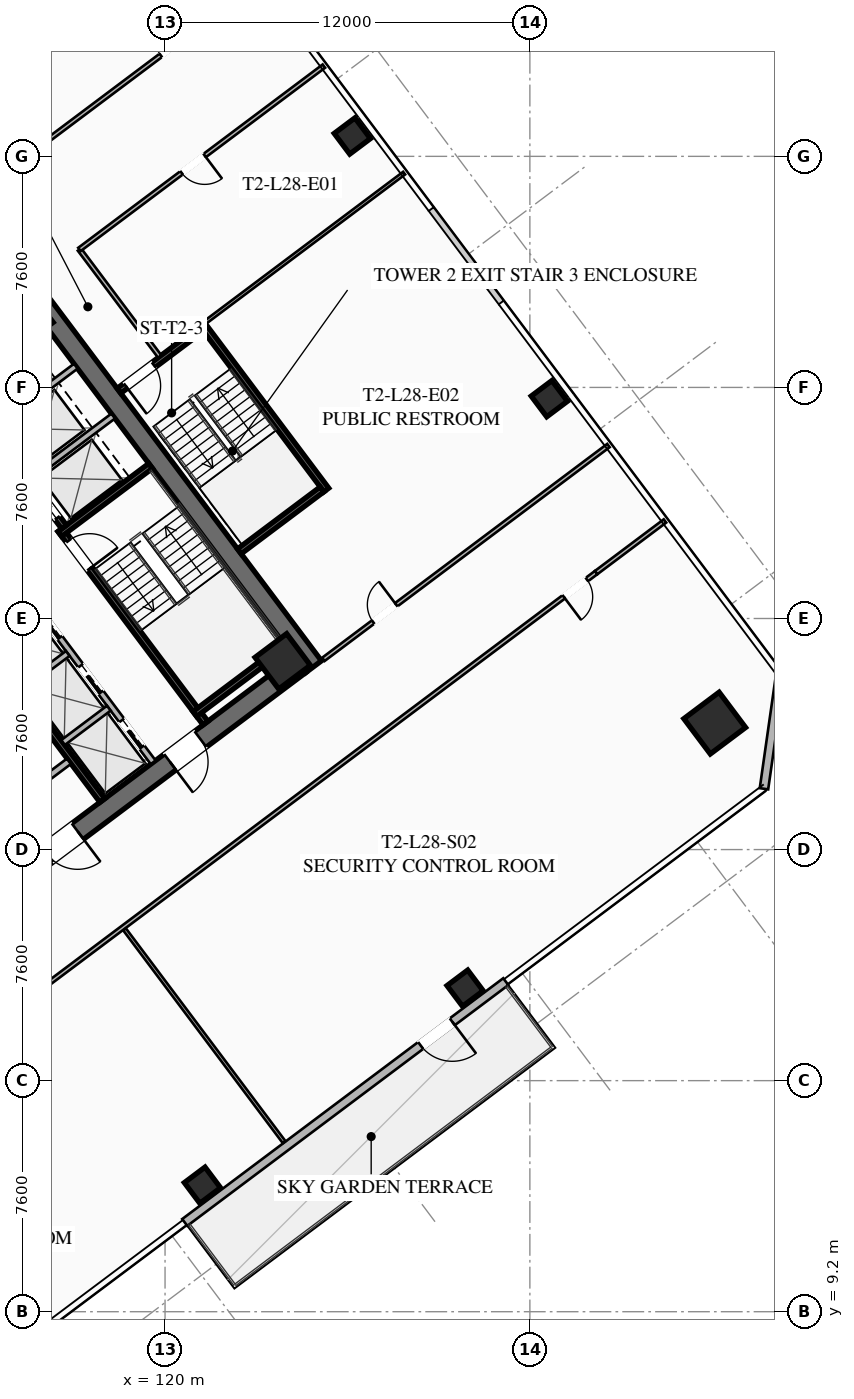
"""IFC4 building model, lengths in metres.
Left out: names, types, materials, properties, quantities, classifications, styles, units other than length and angle.
Written with IfcOpenShell. Run it as: python <this file> out.ifc"""

import sys

from ifc_helpers import new_model, si_unit, direction, frame, frame_2d, origin, origin_2d, place, context, subcontext, project, spatial, rectangle, hollow_rectangle, extrude, element, fill, save


model = new_model("IFC4")
c1 = context("Model", 3, precision=1e-05, world=origin(), true_north=direction((0.0, 1.0)))
c2 = subcontext(c1, "Body", "Model", "MODEL_VIEW")
j1 = project(units=[si_unit("LENGTHUNIT", "METRE"), si_unit("PLANEANGLEUNIT", "RADIAN")], contexts=[c1])
p1 = place(None, origin())
s1 = spatial("IfcSite", under=j1, at=p1, CompositionType="ELEMENT")
p2 = place(p1, origin())
s2 = spatial("IfcBuilding", under=s1, at=p2, CompositionType="ELEMENT")
p3 = place(p2, frame((0.0, 0.0, 106.25)))
s3 = spatial("IfcBuildingStorey", under=s2, at=p3, CompositionType="ELEMENT", Elevation=106.25)
p4 = place(p3, frame((115.524, 42.893, 0.0), z_axis=(0.0, 0.0, 1.0), x_axis=(0.600005007985, -0.799996243986, 0.0)))
e1 = element("IfcWall", 1, at=p4, inside=s3, PredefinedType="SHEAR", context=c2, shape_type="SweptSolid", body=[
    extrude(rectangle(XDim=15.6, YDim=0.65, at=frame_2d((7.8, 0.0))), origin(), (0.0, 0.0, 1.0), 3.55),
])
p5 = place(p3, frame((124.429, 30.478, 0.0), z_axis=(0.0, 0.0, 1.0), x_axis=(-0.799998028465, -0.600002628705, 0.0)))
e2 = element("IfcWall", 2, at=p5, inside=s3, PredefinedType="SHEAR", context=c2, shape_type="SweptSolid", body=[
    extrude(rectangle(XDim=14.86, YDim=0.65, at=frame_2d((7.43, 0.0))), origin(), (0.0, 0.0, 1.0), 3.55),
])
p6 = place(p5, frame((9.13, 0.0, 0.0)))
e3 = element("IfcOpeningElement", 3, at=p6, cuts=e2, PredefinedType="OPENING", context=c2, shape_type="SweptSolid", body=[
    extrude(rectangle(XDim=1.25, YDim=2.25, at=frame_2d((0.625, 1.125))), frame((0.0, 0.335, 0.0), z_axis=(0.0, -1.0, 0.0), x_axis=(1.0, 0.0, 0.0)), (0.0, 0.0, 1.0), 0.67),
])
p7 = place(p5, frame((4.08, 0.0, 0.0)))
e4 = element("IfcOpeningElement", 4, at=p7, cuts=e2, PredefinedType="OPENING", context=c2, shape_type="SweptSolid", body=[
    extrude(rectangle(XDim=1.25, YDim=2.25, at=frame_2d((0.625, 1.125))), frame((0.0, 0.335, 0.0), z_axis=(0.0, -1.0, 0.0), x_axis=(1.0, 0.0, 0.0)), (0.0, 0.0, 1.0), 0.67),
])
for number, where, z_axis, x_axis in (
    (5, (123.87, 30.59, 0.0), (0.0, 0.0, 1.0), (0.8, 0.6, 0.0)),
    (6, (115.41, 41.87, 0.0), (0.0, 0.0, 1.0), (0.8, 0.6, 0.0)),
):
    element("IfcColumn", number, at=place(p3, frame(where, z_axis=z_axis, x_axis=x_axis)), inside=s3, PredefinedType="COLUMN", context=c2, shape_type="SweptSolid", body=[
        extrude(hollow_rectangle(XDim=1.3, YDim=1.3, WallThickness=0.05, at=origin_2d()), origin(), (0.0, 0.0, 1.0), 3.25),
    ])
p8 = place(p3, frame((138.08, 28.56, 0.0), z_axis=(0.0, 0.0, 1.0), x_axis=(0.799999996291, 0.600000004945, 0.0)))
e7 = element("IfcColumn", 7, at=p8, inside=s3, PredefinedType="COLUMN", context=c2, shape_type="SweptSolid", body=[
    extrude(hollow_rectangle(XDim=1.45, YDim=1.45, WallThickness=0.055, at=origin_2d()), origin(), (0.0, 0.0, 1.0), 3.25),
])
for number, where, z_axis, x_axis in (
    (8, (121.23, 13.36, 0.0), (0.0, 0.0, 1.0), (0.8, 0.6, 0.0)),
    (9, (129.87, 19.84, 0.0), (0.0, 0.0, 1.0), (0.8, 0.6, 0.0)),
    (10, (132.64, 39.23, 0.0), (0.0, 0.0, 1.0), (0.8, 0.6, 0.0)),
    (11, (126.16, 47.87, 0.0), (0.0, 0.0, 1.0), (0.8, 0.6, 0.0)),
):
    element("IfcColumn", number, at=place(p3, frame(where, z_axis=z_axis, x_axis=x_axis)), inside=s3, PredefinedType="COLUMN", context=c2, shape_type="SweptSolid", body=[
        extrude(hollow_rectangle(XDim=0.85, YDim=0.85, WallThickness=0.035, at=origin_2d()), origin(), (0.0, 0.0, 1.0), 3.25),
    ])
p9 = place(p3, frame((131.208, 20.056, 0.0), z_axis=(0.0, 0.0, 1.0), x_axis=(-0.800004438899, -0.599994081423, 0.0)))
e12 = element("IfcWall", 12, at=p9, inside=s3, PredefinedType="SOLIDWALL", context=c2, shape_type="SweptSolid", body=[
    extrude(rectangle(XDim=13.2, YDim=0.28, at=frame_2d((6.6, 0.0))), origin(), (0.0, 0.0, 1.0), 3.25),
])
p10 = place(p9, frame((2.2, 0.0, 0.0)))
e13 = element("IfcOpeningElement", 13, at=p10, cuts=e12, PredefinedType="OPENING", context=c2, shape_type="SweptSolid", body=[
    extrude(rectangle(XDim=1.3, YDim=2.15, at=frame_2d((0.65, 1.075))), frame((0.0, 0.15, 0.0), z_axis=(0.0, -1.0, 0.0), x_axis=(1.0, 0.0, 0.0)), (0.0, 0.0, 1.0), 0.3),
])
p11 = place(p3, frame((140.24, 30.18, 0.0), z_axis=(0.0, 0.0, 1.0), x_axis=(-0.141430307517, -0.989948214866, 0.0)))
e14 = element("IfcWall", 14, at=p11, inside=s3, PredefinedType="SOLIDWALL", context=c2, shape_type="SweptSolid", body=[
    extrude(rectangle(XDim=3.818, YDim=0.28, at=frame_2d((1.909, 0.0))), origin(), (0.0, 0.0, 1.0), 3.25),
])
p12 = place(p3, frame((116.56, 34.92, 0.0), z_axis=(0.0, 0.0, 1.0), x_axis=(0.600009827119, -0.799992629566, 0.0)))
e15 = element("IfcWall", 15, at=p12, inside=s3, PredefinedType="SHEAR", context=c2, shape_type="SweptSolid", body=[
    extrude(rectangle(XDim=7.95, YDim=0.2, at=frame_2d((3.975, 0.0))), origin(), (0.0, 0.0, 1.0), 3.25),
])
p13 = place(p12, frame((0.45, 0.0, 0.0)))
e16 = element("IfcOpeningElement", 16, at=p13, cuts=e15, PredefinedType="OPENING", context=c2, shape_type="SweptSolid", body=[
    extrude(rectangle(XDim=1.15, YDim=2.2, at=frame_2d((0.575, 1.1))), frame((0.0, 0.11, 0.0), z_axis=(0.0, -1.0, 0.0), x_axis=(1.0, 0.0, 0.0)), (0.0, 0.0, 1.0), 0.22),
])
for number, where, z_axis, x_axis in (
    (17, (116.54, 34.78, 0.0), (0.0, 0.0, 1.0), (0.8, 0.6, 0.0)),
    (18, (120.98, 28.86, 0.0), (0.0, 0.0, 1.0), (0.8, 0.6, 0.0)),
):
    element("IfcWall", number, at=place(p3, frame(where, z_axis=z_axis, x_axis=x_axis)), inside=s3, PredefinedType="SHEAR", context=c2, shape_type="SweptSolid", body=[
        extrude(rectangle(XDim=3.73, YDim=0.2, at=frame_2d((1.865, 0.0))), origin(), (0.0, 0.0, 1.0), 3.25),
    ])
p14 = place(p3, frame((117.938, 26.016, 0.0), z_axis=(0.0, 0.0, 1.0), x_axis=(-0.600005463273, 0.799995902516, 0.0)))
e19 = element("IfcWall", 19, at=p14, inside=s3, PredefinedType="SHEAR", context=c2, shape_type="SweptSolid", body=[
    extrude(rectangle(XDim=14.3, YDim=0.2, at=frame_2d((7.15, 0.0))), origin(), (0.0, 0.0, 1.0), 3.25),
])
p15 = place(p3, frame((114.316, 25.412, 0.0), z_axis=(0.0, 0.0, 1.0), x_axis=(0.800018601094, 0.59997519774, 0.0)))
e20 = element("IfcWall", 20, at=p15, inside=s3, PredefinedType="SOLIDWALL", context=c2, shape_type="SweptSolid", body=[
    extrude(rectangle(XDim=3.15, YDim=0.22, at=frame_2d((1.575, 0.0))), origin(), (0.0, 0.0, 1.0), 2.393),
])
p16 = place(p15, frame((0.95, 0.0, 0.0)))
e21 = element("IfcOpeningElement", 21, at=p16, cuts=e20, PredefinedType="OPENING", context=c2, shape_type="SweptSolid", body=[
    extrude(rectangle(XDim=1.25, YDim=2.25, at=frame_2d((0.625, 1.125))), frame((0.0, 0.12, 0.0), z_axis=(0.0, -1.0, 0.0), x_axis=(1.0, 0.0, 0.0)), (0.0, 0.0, 1.0), 0.24),
])
p17 = place(p3, frame((112.87, 40.09, 0.0), z_axis=(0.0, 0.0, 1.0), x_axis=(0.599975393228, -0.800018454488, 0.0)))
e22 = element("IfcWall", 22, at=p17, inside=s3, PredefinedType="SHEAR", context=c2, shape_type="SweptSolid", body=[
    extrude(rectangle(XDim=6.35, YDim=0.2, at=frame_2d((3.175, 0.0))), origin(), (0.0, 0.0, 1.0), 3.25),
])
p18 = place(p17, frame((4.875, 0.0, 0.0)))
e23 = element("IfcOpeningElement", 23, at=p18, cuts=e22, PredefinedType="OPENING", context=c2, shape_type="SweptSolid", body=[
    extrude(rectangle(XDim=1.1, YDim=2.2, at=frame_2d((0.55, 1.1))), frame((0.0, 0.11, 0.0), z_axis=(0.0, -1.0, 0.0), x_axis=(1.0, 0.0, 0.0)), (0.0, 0.0, 1.0), 0.22),
])
p19 = place(p17, frame((2.825, 0.0, 0.0)))
e24 = element("IfcOpeningElement", 24, at=p19, cuts=e22, PredefinedType="OPENING", context=c2, shape_type="SweptSolid", body=[
    extrude(rectangle(XDim=1.1, YDim=2.2, at=frame_2d((0.55, 1.1))), frame((0.0, 0.11, 0.0), z_axis=(0.0, -1.0, 0.0), x_axis=(1.0, 0.0, 0.0)), (0.0, 0.0, 1.0), 0.22),
])
p20 = place(p17, frame((0.825, 0.0, 0.0)))
e25 = element("IfcOpeningElement", 25, at=p20, cuts=e22, PredefinedType="OPENING", context=c2, shape_type="SweptSolid", body=[
    extrude(rectangle(XDim=1.1, YDim=2.2, at=frame_2d((0.55, 1.1))), frame((0.0, 0.11, 0.0), z_axis=(0.0, -1.0, 0.0), x_axis=(1.0, 0.0, 0.0)), (0.0, 0.0, 1.0), 0.22),
])
for number, where, z_axis, x_axis in (
    (26, (115.59, 36.63, 0.0), (0.0, 0.0, 1.0), (0.8, 0.6, 0.0)),
    (27, (114.36, 38.27, 0.0), (0.0, 0.0, 1.0), (0.8, 0.6, 0.0)),
):
    element("IfcWall", number, at=place(p3, frame(where, z_axis=z_axis, x_axis=x_axis)), inside=s3, PredefinedType="SOLIDWALL", context=c2, shape_type="SweptSolid", body=[
        extrude(rectangle(XDim=3.38, YDim=0.2, at=frame_2d((1.69, 0.0))), origin(), (0.0, 0.0, 1.0), 3.25),
    ])
p21 = place(p3, frame((119.61, 27.27, 0.0), z_axis=(0.0, 0.0, 1.0), x_axis=(-0.600011488909, 0.79999138319, 0.0)))
e28 = element("IfcWall", 28, at=p21, inside=s3, PredefinedType="SOLIDWALL", context=c2, shape_type="SweptSolid", body=[
    extrude(rectangle(XDim=6.8, YDim=0.2, at=frame_2d((3.4, 0.0))), origin(), (0.0, 0.0, 1.0), 3.25),
])
p22 = place(p21, frame((0.625, 0.0, 0.0)))
e29 = element("IfcOpeningElement", 29, at=p22, cuts=e28, PredefinedType="OPENING", context=c2, shape_type="SweptSolid", body=[
    extrude(rectangle(XDim=1.1, YDim=2.2, at=frame_2d((0.55, 1.1))), frame((0.0, 0.11, 0.0), z_axis=(0.0, -1.0, 0.0), x_axis=(1.0, 0.0, 0.0)), (0.0, 0.0, 1.0), 0.22),
])
p23 = place(p21, frame((2.875, 0.0, 0.0)))
e30 = element("IfcOpeningElement", 30, at=p23, cuts=e28, PredefinedType="OPENING", context=c2, shape_type="SweptSolid", body=[
    extrude(rectangle(XDim=1.1, YDim=2.2, at=frame_2d((0.55, 1.1))), frame((0.0, 0.11, 0.0), z_axis=(0.0, -1.0, 0.0), x_axis=(1.0, 0.0, 0.0)), (0.0, 0.0, 1.0), 0.22),
])
p24 = place(p21, frame((5.125, 0.0, 0.0)))
e31 = element("IfcOpeningElement", 31, at=p24, cuts=e28, PredefinedType="OPENING", context=c2, shape_type="SweptSolid", body=[
    extrude(rectangle(XDim=1.1, YDim=2.2, at=frame_2d((0.55, 1.1))), frame((0.0, 0.11, 0.0), z_axis=(0.0, -1.0, 0.0), x_axis=(1.0, 0.0, 0.0)), (0.0, 0.0, 1.0), 0.22),
])
p25 = place(p3, frame((116.646, 27.922, 0.0), z_axis=(0.0, 0.0, 1.0), x_axis=(0.8, 0.6, 0.0)))
e32 = element("IfcWall", 32, at=p25, inside=s3, PredefinedType="SOLIDWALL", context=c2, shape_type="SweptSolid", body=[
    extrude(rectangle(XDim=1.88, YDim=0.2, at=frame_2d((0.94, 0.0))), origin(), (0.0, 0.0, 1.0), 3.25),
])
p26 = place(p3, frame((115.296, 29.722, 0.0), z_axis=(0.0, 0.0, 1.0), x_axis=(0.799984418148, 0.600020775241, 0.0)))
e33 = element("IfcWall", 33, at=p26, inside=s3, PredefinedType="SOLIDWALL", context=c2, shape_type="SweptSolid", body=[
    extrude(rectangle(XDim=1.88, YDim=0.2, at=frame_2d((0.94, 0.0))), origin(), (0.0, 0.0, 1.0), 3.25),
])
p27 = place(p3, frame((125.304, 36.228, 0.0), z_axis=(0.0, 0.0, 1.0), x_axis=(-0.59998851072, 0.800008616831, 0.0)))
e34 = element("IfcWall", 34, at=p27, inside=s3, PredefinedType="SHEAR", context=c2, shape_type="SweptSolid", body=[
    extrude(rectangle(XDim=6.8, YDim=0.2, at=frame_2d((3.4, 0.0))), origin(), (0.0, 0.0, 1.0), 3.25),
])
p28 = place(p3, frame((121.204, 41.528, 0.0), z_axis=(0.0, 0.0, 1.0), x_axis=(-0.800017232136, -0.599977023131, 0.0)))
e35 = element("IfcWall", 35, at=p28, inside=s3, PredefinedType="SHEAR", context=c2, shape_type="SweptSolid", body=[
    extrude(rectangle(XDim=3.4, YDim=0.2, at=frame_2d((1.7, 0.0))), origin(), (0.0, 0.0, 1.0), 3.25),
])
p29 = place(p28, frame((1.975, 0.0, 0.0)))
e36 = element("IfcOpeningElement", 36, at=p29, cuts=e35, PredefinedType="OPENING", context=c2, shape_type="SweptSolid", body=[
    extrude(rectangle(XDim=1.15, YDim=2.2, at=frame_2d((0.575, 1.1))), frame((0.0, 0.11, 0.0), z_axis=(0.0, -1.0, 0.0), x_axis=(1.0, 0.0, 0.0)), (0.0, 0.0, 1.0), 0.22),
])
p30 = place(p3, frame((122.444, 34.208, 0.0), z_axis=(0.0, 0.0, 1.0), x_axis=(0.79999138319, 0.600011488909, 0.0)))
e37 = element("IfcWall", 37, at=p30, inside=s3, PredefinedType="SHEAR", context=c2, shape_type="SweptSolid", body=[
    extrude(rectangle(XDim=3.4, YDim=0.2, at=frame_2d((1.7, 0.0))), origin(), (0.0, 0.0, 1.0), 3.25),
])
p31 = place(p3, frame((119.824, 40.618, 0.0), z_axis=(0.0, 0.0, 1.0), x_axis=(-0.599982243973, 0.800013316712, 0.0)))
e38 = element("IfcWall", 38, at=p31, inside=s3, PredefinedType="PARTITIONING", context=c2, shape_type="SweptSolid", body=[
    extrude(rectangle(XDim=4.4, YDim=0.135, at=frame_2d((2.2, 0.0))), origin(), (0.0, 0.0, 1.0), 2.393),
])
p32 = place(p3, frame((98.276, 34.332, 0.0), z_axis=(0.0, 0.0, 1.0), x_axis=(0.800003113347, 0.599995848849, 0.0)))
e39 = element("IfcWall", 39, at=p32, inside=s3, PredefinedType="PARTITIONING", context=c2, shape_type="SweptSolid", body=[
    extrude(rectangle(XDim=28.23, YDim=0.135, at=frame_2d((14.115, 0.0))), origin(), (0.0, 0.0, 1.0), 2.393),
])
p33 = place(p32, frame((26.98, 0.0, 0.0)))
e40 = element("IfcOpeningElement", 40, at=p33, cuts=e39, PredefinedType="OPENING", context=c2, shape_type="SweptSolid", body=[
    extrude(rectangle(XDim=0.95, YDim=2.05, at=frame_2d((0.475, 1.025))), frame((0.0, 0.077, 0.0), z_axis=(0.0, -1.0, 0.0), x_axis=(1.0, 0.0, 0.0)), (0.0, 0.0, 1.0), 0.155),
])
p34 = place(p3, frame((134.18, 33.51, 0.0), z_axis=(0.0, 0.0, 1.0), x_axis=(-0.8, -0.6, 0.0)))
e41 = element("IfcWall", 41, at=p34, inside=s3, PredefinedType="PARTITIONING", context=c2, shape_type="SweptSolid", body=[
    extrude(rectangle(XDim=28.23, YDim=0.135, at=frame_2d((14.115, 0.0))), origin(), (0.0, 0.0, 1.0), 2.393),
])
p35 = place(p34, frame((25.637, 0.0, 0.0)))
e42 = element("IfcOpeningElement", 42, at=p35, cuts=e41, PredefinedType="OPENING", context=c2, shape_type="SweptSolid", body=[
    extrude(rectangle(XDim=0.95, YDim=2.05, at=frame_2d((0.475, 1.025))), frame((0.0, 0.077, 0.0), z_axis=(0.0, -1.0, 0.0), x_axis=(1.0, 0.0, 0.0)), (0.0, 0.0, 1.0), 0.155),
])
p36 = place(p34, frame((0.38, 0.0, 0.0)))
e43 = element("IfcOpeningElement", 43, at=p36, cuts=e41, PredefinedType="OPENING", context=c2, shape_type="SweptSolid", body=[
    extrude(rectangle(XDim=0.95, YDim=2.05, at=frame_2d((0.475, 1.025))), frame((0.0, 0.077, 0.0), z_axis=(0.0, -1.0, 0.0), x_axis=(1.0, 0.0, 0.0)), (0.0, 0.0, 1.0), 0.155),
])
p37 = place(p3, frame((134.18, 33.51, 0.0), z_axis=(0.0, 0.0, 1.0), x_axis=(0.8000207031, 0.599972394874, 0.0)))
e44 = element("IfcWall", 44, at=p37, inside=s3, PredefinedType="PARTITIONING", context=c2, shape_type="SweptSolid", body=[
    extrude(rectangle(XDim=2.83, YDim=0.135, at=frame_2d((1.415, 0.0))), origin(), (0.0, 0.0, 1.0), 2.393),
])
p38 = place(p3, frame((123.918, 14.776, 0.0), z_axis=(0.0, 0.0, 1.0), x_axis=(-0.6, 0.8, 0.0)))
e45 = element("IfcWall", 45, at=p38, inside=s3, PredefinedType="PARTITIONING", context=c2, shape_type="SweptSolid", body=[
    extrude(rectangle(XDim=8.75, YDim=0.11, at=frame_2d((4.375, 0.0))), origin(), (0.0, 0.0, 1.0), 2.393),
])
p39 = place(p3, frame((125.224, 50.168, 0.0), z_axis=(0.0, 0.0, 1.0), x_axis=(-0.8, -0.6, 0.0)))
e46 = element("IfcWall", 46, at=p39, inside=s3, PredefinedType="PARTITIONING", context=c2, shape_type="SweptSolid", body=[
    extrude(rectangle(XDim=10.05, YDim=0.135, at=frame_2d((5.025, 0.0))), origin(), (0.0, 0.0, 1.0), 2.393),
])
p40 = place(p39, frame((4.9, 0.0, 0.0)))
e47 = element("IfcOpeningElement", 47, at=p40, cuts=e46, PredefinedType="OPENING", context=c2, shape_type="SweptSolid", body=[
    extrude(rectangle(XDim=0.95, YDim=2.05, at=frame_2d((0.475, 1.025))), frame((0.0, 0.077, 0.0), z_axis=(0.0, -1.0, 0.0), x_axis=(1.0, 0.0, 0.0)), (0.0, 0.0, 1.0), 0.155),
])
p41 = place(p3, frame((125.208, 30.656, 0.0), z_axis=(0.0, 0.0, 1.0), x_axis=(0.8, 0.6, 0.0)))
e48 = element("IfcWall", 48, at=p41, inside=s3, PredefinedType="PARTITIONING", context=c2, shape_type="SweptSolid", body=[
    extrude(rectangle(XDim=11.72, YDim=0.135, at=frame_2d((5.86, 0.0))), origin(), (0.0, 0.0, 1.0), 2.393),
])
p42 = place(p41, frame((2.045, 0.0, 0.0)))
e49 = element("IfcOpeningElement", 49, at=p42, cuts=e48, PredefinedType="OPENING", context=c2, shape_type="SweptSolid", body=[
    extrude(rectangle(XDim=0.95, YDim=2.05, at=frame_2d((0.475, 1.025))), frame((0.0, 0.077, 0.0), z_axis=(0.0, -1.0, 0.0), x_axis=(1.0, 0.0, 0.0)), (0.0, 0.0, 1.0), 0.155),
])
p43 = place(p3, frame((127.864, 46.648, 0.0), z_axis=(0.0, 0.0, 1.0), x_axis=(-0.800007145523, -0.599990472518, 0.0)))
e50 = element("IfcWall", 50, at=p43, inside=s3, PredefinedType="PARTITIONING", context=c2, shape_type="SweptSolid", body=[
    extrude(rectangle(XDim=8.2, YDim=0.11, at=frame_2d((4.1, 0.0))), origin(), (0.0, 0.0, 1.0), 2.393),
])
p44 = place(p10, origin())
e51 = element("IfcDoor", 51, at=p44, inside=s3, OperationType="SINGLE_SWING_LEFT", PredefinedType="DOOR", context=c2, shape_type="SweptSolid", body=[
    extrude(rectangle(XDim=1.3, YDim=2.15, at=frame_2d((0.65, 1.075))), frame((0.0, 0.025, 0.0), z_axis=(0.0, -1.0, 0.0), x_axis=(1.0, 0.0, 0.0)), (0.0, 0.0, 1.0), 0.05),
])
fill(e13, e51)
p45 = place(p6, origin())
e52 = element("IfcDoor", 52, at=p45, inside=s3, OperationType="SINGLE_SWING_LEFT", PredefinedType="DOOR", context=c2, shape_type="SweptSolid", body=[
    extrude(rectangle(XDim=1.25, YDim=2.25, at=frame_2d((0.625, 1.125))), frame((0.0, 0.025, 0.0), z_axis=(0.0, -1.0, 0.0), x_axis=(1.0, 0.0, 0.0)), (0.0, 0.0, 1.0), 0.05),
])
fill(e3, e52)
p46 = place(p7, origin())
e53 = element("IfcDoor", 53, at=p46, inside=s3, OperationType="SINGLE_SWING_RIGHT", PredefinedType="DOOR", context=c2, shape_type="SweptSolid", body=[
    extrude(rectangle(XDim=1.25, YDim=2.25, at=frame_2d((0.625, 1.125))), frame((0.0, 0.025, 0.0), z_axis=(0.0, -1.0, 0.0), x_axis=(1.0, 0.0, 0.0)), (0.0, 0.0, 1.0), 0.05),
])
fill(e4, e53)
p47 = place(p13, origin())
e54 = element("IfcDoor", 54, at=p47, inside=s3, OperationType="SINGLE_SWING_RIGHT", PredefinedType="DOOR", context=c2, shape_type="SweptSolid", body=[
    extrude(rectangle(XDim=1.15, YDim=2.2, at=frame_2d((0.575, 1.1))), frame((0.0, 0.025, 0.0), z_axis=(0.0, -1.0, 0.0), x_axis=(1.0, 0.0, 0.0)), (0.0, 0.0, 1.0), 0.05),
])
fill(e16, e54)
p48 = place(p29, origin())
e55 = element("IfcDoor", 55, at=p48, inside=s3, OperationType="SINGLE_SWING_RIGHT", PredefinedType="DOOR", context=c2, shape_type="SweptSolid", body=[
    extrude(rectangle(XDim=1.15, YDim=2.2, at=frame_2d((0.575, 1.1))), frame((0.0, 0.025, 0.0), z_axis=(0.0, -1.0, 0.0), x_axis=(1.0, 0.0, 0.0)), (0.0, 0.0, 1.0), 0.05),
])
fill(e36, e55)
p49 = place(p33, origin())
e56 = element("IfcDoor", 56, at=p49, inside=s3, OperationType="SINGLE_SWING_RIGHT", PredefinedType="DOOR", context=c2, shape_type="SweptSolid", body=[
    extrude(rectangle(XDim=0.95, YDim=2.05, at=frame_2d((0.475, 1.025))), frame((0.0, 0.025, 0.0), z_axis=(0.0, -1.0, 0.0), x_axis=(1.0, 0.0, 0.0)), (0.0, 0.0, 1.0), 0.05),
])
fill(e40, e56)
p50 = place(p36, origin())
e57 = element("IfcDoor", 57, at=p50, inside=s3, OperationType="SINGLE_SWING_RIGHT", PredefinedType="DOOR", context=c2, shape_type="SweptSolid", body=[
    extrude(rectangle(XDim=0.95, YDim=2.05, at=frame_2d((0.475, 1.025))), frame((0.0, 0.025, 0.0), z_axis=(0.0, -1.0, 0.0), x_axis=(1.0, 0.0, 0.0)), (0.0, 0.0, 1.0), 0.05),
])
fill(e43, e57)
p51 = place(p40, origin())
e58 = element("IfcDoor", 58, at=p51, inside=s3, OperationType="SINGLE_SWING_LEFT", PredefinedType="DOOR", context=c2, shape_type="SweptSolid", body=[
    extrude(rectangle(XDim=0.95, YDim=2.05, at=frame_2d((0.475, 1.025))), frame((0.0, 0.025, 0.0), z_axis=(0.0, -1.0, 0.0), x_axis=(1.0, 0.0, 0.0)), (0.0, 0.0, 1.0), 0.05),
])
fill(e47, e58)
p52 = place(p42, origin())
e59 = element("IfcDoor", 59, at=p52, inside=s3, OperationType="SINGLE_SWING_RIGHT", PredefinedType="DOOR", context=c2, shape_type="SweptSolid", body=[
    extrude(rectangle(XDim=0.95, YDim=2.05, at=frame_2d((0.475, 1.025))), frame((0.0, 0.025, 0.0), z_axis=(0.0, -1.0, 0.0), x_axis=(1.0, 0.0, 0.0)), (0.0, 0.0, 1.0), 0.05),
])
fill(e49, e59)
p53 = place(p22, origin())
e60 = element("IfcDoor", 60, at=p53, inside=s3, OperationType="SLIDING_TO_LEFT", PredefinedType="DOOR", context=c2, shape_type="SweptSolid", body=[
    extrude(rectangle(XDim=1.1, YDim=2.2, at=frame_2d((0.55, 1.1))), frame((0.0, 0.025, 0.0), z_axis=(0.0, -1.0, 0.0), x_axis=(1.0, 0.0, 0.0)), (0.0, 0.0, 1.0), 0.05),
])
fill(e29, e60)
p54 = place(p23, origin())
e61 = element("IfcDoor", 61, at=p54, inside=s3, OperationType="SLIDING_TO_LEFT", PredefinedType="DOOR", context=c2, shape_type="SweptSolid", body=[
    extrude(rectangle(XDim=1.1, YDim=2.2, at=frame_2d((0.55, 1.1))), frame((0.0, 0.025, 0.0), z_axis=(0.0, -1.0, 0.0), x_axis=(1.0, 0.0, 0.0)), (0.0, 0.0, 1.0), 0.05),
])
fill(e30, e61)
p55 = place(p24, origin())
e62 = element("IfcDoor", 62, at=p55, inside=s3, OperationType="SLIDING_TO_LEFT", PredefinedType="DOOR", context=c2, shape_type="SweptSolid", body=[
    extrude(rectangle(XDim=1.1, YDim=2.2, at=frame_2d((0.55, 1.1))), frame((0.0, 0.025, 0.0), z_axis=(0.0, -1.0, 0.0), x_axis=(1.0, 0.0, 0.0)), (0.0, 0.0, 1.0), 0.05),
])
fill(e31, e62)
p56 = place(p18, origin())
e63 = element("IfcDoor", 63, at=p56, inside=s3, OperationType="SLIDING_TO_LEFT", PredefinedType="DOOR", context=c2, shape_type="SweptSolid", body=[
    extrude(rectangle(XDim=1.1, YDim=2.2, at=frame_2d((0.55, 1.1))), frame((0.0, 0.025, 0.0), z_axis=(0.0, -1.0, 0.0), x_axis=(1.0, 0.0, 0.0)), (0.0, 0.0, 1.0), 0.05),
])
fill(e23, e63)
save(model, sys.argv[1])
